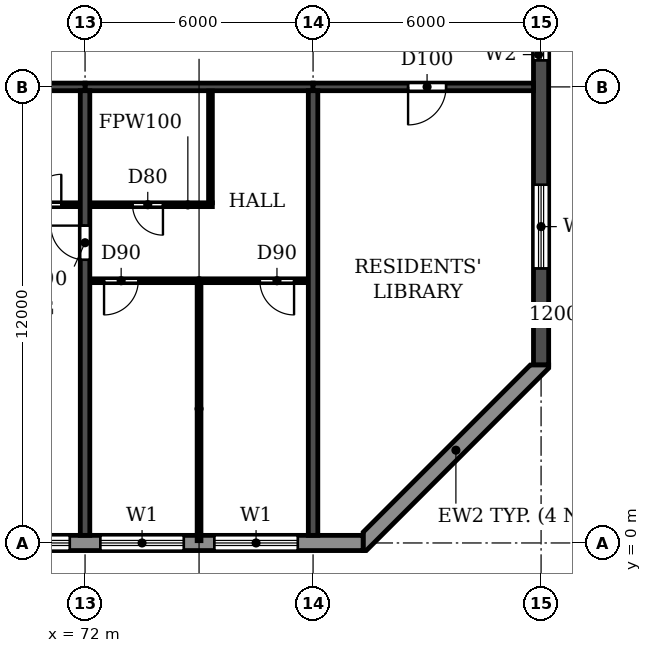
"""IFC4 building model, lengths in metres.
Left out: names, types, materials, properties, quantities, classifications, styles, units other than length and angle.
Written with IfcOpenShell. Run it as: python <this file> out.ifc"""

import sys

from ifc_helpers import new_model, si_unit, direction, frame, frame_2d, origin, place, context, subcontext, project, spatial, polyline, rectangle, outline, extrude, element, fill, save


model = new_model("IFC4")
c1 = context("Model", 3, precision=1e-05, world=origin(), true_north=direction((0.0, 1.0)))
c2 = subcontext(c1, "Body", "Model", "MODEL_VIEW")
j1 = project(units=[si_unit("LENGTHUNIT", "METRE"), si_unit("PLANEANGLEUNIT", "RADIAN")], contexts=[c1])
p1 = place(None, origin())
s1 = spatial("IfcSite", under=j1, at=p1, CompositionType="ELEMENT")
p2 = place(p1, origin())
s2 = spatial("IfcBuilding", under=s1, at=p2, CompositionType="ELEMENT")
p3 = place(p2, frame((0.0, 0.0, 231.3)))
s3 = spatial("IfcBuildingStorey", under=s2, at=p3, CompositionType="ELEMENT", Elevation=231.3)
p4 = place(p3, frame((72.0, 0.2, 0.0), z_axis=(0.0, 0.0, 1.0), x_axis=(0.0, 1.0, 0.0)))
e1 = element("IfcWall", 1, at=p4, inside=s3, PredefinedType="SHEAR", context=c2, shape_type="SweptSolid", body=[
    extrude(rectangle(XDim=11.7, YDim=0.25, at=frame_2d((5.85, 0.0))), origin(), (0.0, 0.0, 1.0), 3.08),
])
p5 = place(p4, frame((7.25, 0.0, 0.0)))
e2 = element("IfcOpeningElement", 2, at=p5, cuts=e1, PredefinedType="OPENING", context=c2, shape_type="SweptSolid", body=[
    extrude(rectangle(XDim=0.9, YDim=2.1, at=frame_2d((0.45, 1.05))), frame((0.0, 0.135, 0.0), z_axis=(0.0, -1.0, 0.0), x_axis=(1.0, 0.0, 0.0)), (0.0, 0.0, 1.0), 0.27),
])
p6 = place(p3, frame((78.0, 0.2, 0.0), z_axis=(0.0, 0.0, 1.0), x_axis=(0.0, 1.0, 0.0)))
e3 = element("IfcWall", 3, at=p6, inside=s3, PredefinedType="SHEAR", context=c2, shape_type="SweptSolid", body=[
    extrude(rectangle(XDim=11.7, YDim=0.25, at=frame_2d((5.85, 0.0))), origin(), (0.0, 0.0, 1.0), 3.08),
])
p7 = place(p3, frame((84.0, 4.683, 0.0), z_axis=(0.0, 0.0, 1.0), x_axis=(0.0, 1.0, 0.0)))
e4 = element("IfcWall", 4, at=p7, inside=s3, PredefinedType="SHEAR", context=c2, shape_type="SweptSolid", body=[
    extrude(rectangle(XDim=31.834, YDim=0.4, at=frame_2d((15.917, 0.0))), origin(), (0.0, 0.0, 1.0), 3.08),
])
p8 = place(p7, frame((23.817, 0.0, 0.9)))
e5 = element("IfcOpeningElement", 5, at=p8, cuts=e4, PredefinedType="OPENING", context=c2, shape_type="SweptSolid", body=[
    extrude(rectangle(XDim=1.2, YDim=1.5, at=frame_2d((0.6, 0.75))), frame((0.0, 0.21, 0.0), z_axis=(0.0, -1.0, 0.0), x_axis=(1.0, 0.0, 0.0)), (0.0, 0.0, 1.0), 0.42),
])
p9 = place(p7, frame((8.017, 0.0, 0.9)))
e6 = element("IfcOpeningElement", 6, at=p9, cuts=e4, PredefinedType="OPENING", context=c2, shape_type="SweptSolid", body=[
    extrude(rectangle(XDim=1.2, YDim=1.5, at=frame_2d((0.6, 0.75))), frame((0.0, 0.21, 0.0), z_axis=(0.0, -1.0, 0.0), x_axis=(1.0, 0.0, 0.0)), (0.0, 0.0, 1.0), 0.42),
])
p10 = place(p7, frame((27.694, 0.0, 0.6)))
e7 = element("IfcOpeningElement", 7, at=p10, cuts=e4, PredefinedType="OPENING", context=c2, shape_type="SweptSolid", body=[
    extrude(rectangle(XDim=2.2, YDim=1.8, at=frame_2d((1.1, 0.9))), frame((0.0, 0.21, 0.0), z_axis=(0.0, -1.0, 0.0), x_axis=(1.0, 0.0, 0.0)), (0.0, 0.0, 1.0), 0.42),
])
p11 = place(p7, frame((2.541, 0.0, 0.6)))
e8 = element("IfcOpeningElement", 8, at=p11, cuts=e4, PredefinedType="OPENING", context=c2, shape_type="SweptSolid", body=[
    extrude(rectangle(XDim=2.2, YDim=1.8, at=frame_2d((1.1, 0.9))), frame((0.0, 0.21, 0.0), z_axis=(0.0, -1.0, 0.0), x_axis=(1.0, 0.0, 0.0)), (0.0, 0.0, 1.0), 0.42),
])
p12 = place(p7, frame((15.917, 0.0, 0.9)))
e9 = element("IfcOpeningElement", 9, at=p12, cuts=e4, PredefinedType="OPENING", context=c2, shape_type="SweptSolid", body=[
    extrude(rectangle(XDim=1.2, YDim=1.5, at=frame_2d((0.6, 0.75))), frame((0.0, 0.21, 0.0), z_axis=(0.0, -1.0, 0.0), x_axis=(1.0, 0.0, 0.0)), (0.0, 0.0, 1.0), 0.42),
])
p13 = place(p3, frame((66.0, 12.0, 0.0), z_axis=(0.0, 0.0, 1.0), x_axis=(1.0, 0.0, 0.0)))
e10 = element("IfcWall", 10, at=p13, inside=s3, PredefinedType="SHEAR", context=c2, shape_type="SweptSolid", body=[
    extrude(rectangle(XDim=6.0, YDim=0.2, at=frame_2d((3.0, 0.0))), origin(), (0.0, 0.0, 1.0), 2.48),
])
p14 = place(p13, frame((2.55, 0.0, 0.0)))
e11 = element("IfcOpeningElement", 11, at=p14, cuts=e10, PredefinedType="OPENING", context=c2, shape_type="SweptSolid", body=[
    extrude(rectangle(XDim=1.0, YDim=2.1, at=frame_2d((0.5, 1.05))), frame((0.0, 0.11, 0.0), z_axis=(0.0, -1.0, 0.0), x_axis=(1.0, 0.0, 0.0)), (0.0, 0.0, 1.0), 0.22),
])
p15 = place(p3, frame((72.0, 12.0, 0.0), z_axis=(0.0, 0.0, 1.0), x_axis=(1.0, 0.0, 0.0)))
e12 = element("IfcWall", 12, at=p15, inside=s3, PredefinedType="SHEAR", context=c2, shape_type="SweptSolid", body=[
    extrude(rectangle(XDim=6.0, YDim=0.2, at=frame_2d((3.0, 0.0))), origin(), (0.0, 0.0, 1.0), 2.48),
])
p16 = place(p3, frame((78.0, 12.0, 0.0), z_axis=(0.0, 0.0, 1.0), x_axis=(1.0, 0.0, 0.0)))
e13 = element("IfcWall", 13, at=p16, inside=s3, PredefinedType="SHEAR", context=c2, shape_type="SweptSolid", body=[
    extrude(rectangle(XDim=5.8, YDim=0.2, at=frame_2d((2.9, 0.0))), origin(), (0.0, 0.0, 1.0), 2.48),
])
p17 = place(p16, frame((2.5, 0.0, 0.0)))
e14 = element("IfcOpeningElement", 14, at=p17, cuts=e13, PredefinedType="OPENING", context=c2, shape_type="SweptSolid", body=[
    extrude(rectangle(XDim=1.0, YDim=2.1, at=frame_2d((0.5, 1.05))), frame((0.0, 0.11, 0.0), z_axis=(0.0, -1.0, 0.0), x_axis=(1.0, 0.0, 0.0)), (0.0, 0.0, 1.0), 0.22),
])
p18 = place(p3, frame((22.683, 0.0, 0.0), z_axis=(0.0, 0.0, 1.0), x_axis=(1.0, 0.0, 0.0)))
e15 = element("IfcWall", 15, at=p18, inside=s3, PredefinedType="STANDARD", context=c2, shape_type="SweptSolid", body=[
    extrude(rectangle(XDim=56.634, YDim=0.4, at=frame_2d((28.317, 0.0))), origin(), (0.0, 0.0, 1.0), 3.08),
])
p19 = place(p18, frame((1.917, 0.0, 0.0)))
e16 = element("IfcOpeningElement", 16, at=p19, cuts=e15, PredefinedType="OPENING", context=c2, shape_type="SweptSolid", body=[
    extrude(rectangle(XDim=1.8, YDim=2.4, at=frame_2d((0.9, 1.2))), frame((0.0, 0.21, 0.0), z_axis=(0.0, -1.0, 0.0), x_axis=(1.0, 0.0, 0.0)), (0.0, 0.0, 1.0), 0.42),
])
p20 = place(p18, frame((4.717, 0.0, 0.9)))
e17 = element("IfcOpeningElement", 17, at=p20, cuts=e15, PredefinedType="OPENING", context=c2, shape_type="SweptSolid", body=[
    extrude(rectangle(XDim=2.2, YDim=1.5, at=frame_2d((1.1, 0.75))), frame((0.0, 0.21, 0.0), z_axis=(0.0, -1.0, 0.0), x_axis=(1.0, 0.0, 0.0)), (0.0, 0.0, 1.0), 0.42),
])
p21 = place(p18, frame((7.717, 0.0, 0.9)))
e18 = element("IfcOpeningElement", 18, at=p21, cuts=e15, PredefinedType="OPENING", context=c2, shape_type="SweptSolid", body=[
    extrude(rectangle(XDim=2.2, YDim=1.5, at=frame_2d((1.1, 0.75))), frame((0.0, 0.21, 0.0), z_axis=(0.0, -1.0, 0.0), x_axis=(1.0, 0.0, 0.0)), (0.0, 0.0, 1.0), 0.42),
])
p22 = place(p18, frame((10.717, 0.0, 0.9)))
e19 = element("IfcOpeningElement", 19, at=p22, cuts=e15, PredefinedType="OPENING", context=c2, shape_type="SweptSolid", body=[
    extrude(rectangle(XDim=2.2, YDim=1.5, at=frame_2d((1.1, 0.75))), frame((0.0, 0.21, 0.0), z_axis=(0.0, -1.0, 0.0), x_axis=(1.0, 0.0, 0.0)), (0.0, 0.0, 1.0), 0.42),
])
p23 = place(p18, frame((13.717, 0.0, 0.9)))
e20 = element("IfcOpeningElement", 20, at=p23, cuts=e15, PredefinedType="OPENING", context=c2, shape_type="SweptSolid", body=[
    extrude(rectangle(XDim=2.2, YDim=1.5, at=frame_2d((1.1, 0.75))), frame((0.0, 0.21, 0.0), z_axis=(0.0, -1.0, 0.0), x_axis=(1.0, 0.0, 0.0)), (0.0, 0.0, 1.0), 0.42),
])
p24 = place(p18, frame((16.917, 0.0, 0.0)))
e21 = element("IfcOpeningElement", 21, at=p24, cuts=e15, PredefinedType="OPENING", context=c2, shape_type="SweptSolid", body=[
    extrude(rectangle(XDim=1.8, YDim=2.4, at=frame_2d((0.9, 1.2))), frame((0.0, 0.21, 0.0), z_axis=(0.0, -1.0, 0.0), x_axis=(1.0, 0.0, 0.0)), (0.0, 0.0, 1.0), 0.42),
])
p25 = place(p18, frame((19.717, 0.0, 0.9)))
e22 = element("IfcOpeningElement", 22, at=p25, cuts=e15, PredefinedType="OPENING", context=c2, shape_type="SweptSolid", body=[
    extrude(rectangle(XDim=2.2, YDim=1.5, at=frame_2d((1.1, 0.75))), frame((0.0, 0.21, 0.0), z_axis=(0.0, -1.0, 0.0), x_axis=(1.0, 0.0, 0.0)), (0.0, 0.0, 1.0), 0.42),
])
p26 = place(p18, frame((22.717, 0.0, 0.9)))
e23 = element("IfcOpeningElement", 23, at=p26, cuts=e15, PredefinedType="OPENING", context=c2, shape_type="SweptSolid", body=[
    extrude(rectangle(XDim=2.2, YDim=1.5, at=frame_2d((1.1, 0.75))), frame((0.0, 0.21, 0.0), z_axis=(0.0, -1.0, 0.0), x_axis=(1.0, 0.0, 0.0)), (0.0, 0.0, 1.0), 0.42),
])
p27 = place(p18, frame((25.917, 0.0, 0.0)))
e24 = element("IfcOpeningElement", 24, at=p27, cuts=e15, PredefinedType="OPENING", context=c2, shape_type="SweptSolid", body=[
    extrude(rectangle(XDim=1.8, YDim=2.4, at=frame_2d((0.9, 1.2))), frame((0.0, 0.21, 0.0), z_axis=(0.0, -1.0, 0.0), x_axis=(1.0, 0.0, 0.0)), (0.0, 0.0, 1.0), 0.42),
])
p28 = place(p18, frame((28.717, 0.0, 0.9)))
e25 = element("IfcOpeningElement", 25, at=p28, cuts=e15, PredefinedType="OPENING", context=c2, shape_type="SweptSolid", body=[
    extrude(rectangle(XDim=2.2, YDim=1.5, at=frame_2d((1.1, 0.75))), frame((0.0, 0.21, 0.0), z_axis=(0.0, -1.0, 0.0), x_axis=(1.0, 0.0, 0.0)), (0.0, 0.0, 1.0), 0.42),
])
p29 = place(p18, frame((31.717, 0.0, 0.9)))
e26 = element("IfcOpeningElement", 26, at=p29, cuts=e15, PredefinedType="OPENING", context=c2, shape_type="SweptSolid", body=[
    extrude(rectangle(XDim=2.2, YDim=1.5, at=frame_2d((1.1, 0.75))), frame((0.0, 0.21, 0.0), z_axis=(0.0, -1.0, 0.0), x_axis=(1.0, 0.0, 0.0)), (0.0, 0.0, 1.0), 0.42),
])
p30 = place(p18, frame((34.717, 0.0, 0.9)))
e27 = element("IfcOpeningElement", 27, at=p30, cuts=e15, PredefinedType="OPENING", context=c2, shape_type="SweptSolid", body=[
    extrude(rectangle(XDim=2.2, YDim=1.5, at=frame_2d((1.1, 0.75))), frame((0.0, 0.21, 0.0), z_axis=(0.0, -1.0, 0.0), x_axis=(1.0, 0.0, 0.0)), (0.0, 0.0, 1.0), 0.42),
])
p31 = place(p18, frame((37.717, 0.0, 0.9)))
e28 = element("IfcOpeningElement", 28, at=p31, cuts=e15, PredefinedType="OPENING", context=c2, shape_type="SweptSolid", body=[
    extrude(rectangle(XDim=2.2, YDim=1.5, at=frame_2d((1.1, 0.75))), frame((0.0, 0.21, 0.0), z_axis=(0.0, -1.0, 0.0), x_axis=(1.0, 0.0, 0.0)), (0.0, 0.0, 1.0), 0.42),
])
p32 = place(p18, frame((40.917, 0.0, 0.0)))
e29 = element("IfcOpeningElement", 29, at=p32, cuts=e15, PredefinedType="OPENING", context=c2, shape_type="SweptSolid", body=[
    extrude(rectangle(XDim=1.8, YDim=2.4, at=frame_2d((0.9, 1.2))), frame((0.0, 0.21, 0.0), z_axis=(0.0, -1.0, 0.0), x_axis=(1.0, 0.0, 0.0)), (0.0, 0.0, 1.0), 0.42),
])
p33 = place(p18, frame((43.717, 0.0, 0.9)))
e30 = element("IfcOpeningElement", 30, at=p33, cuts=e15, PredefinedType="OPENING", context=c2, shape_type="SweptSolid", body=[
    extrude(rectangle(XDim=2.2, YDim=1.5, at=frame_2d((1.1, 0.75))), frame((0.0, 0.21, 0.0), z_axis=(0.0, -1.0, 0.0), x_axis=(1.0, 0.0, 0.0)), (0.0, 0.0, 1.0), 0.42),
])
p34 = place(p18, frame((46.717, 0.0, 0.9)))
e31 = element("IfcOpeningElement", 31, at=p34, cuts=e15, PredefinedType="OPENING", context=c2, shape_type="SweptSolid", body=[
    extrude(rectangle(XDim=2.2, YDim=1.5, at=frame_2d((1.1, 0.75))), frame((0.0, 0.21, 0.0), z_axis=(0.0, -1.0, 0.0), x_axis=(1.0, 0.0, 0.0)), (0.0, 0.0, 1.0), 0.42),
])
p35 = place(p18, frame((49.717, 0.0, 0.9)))
e32 = element("IfcOpeningElement", 32, at=p35, cuts=e15, PredefinedType="OPENING", context=c2, shape_type="SweptSolid", body=[
    extrude(rectangle(XDim=2.2, YDim=1.5, at=frame_2d((1.1, 0.75))), frame((0.0, 0.21, 0.0), z_axis=(0.0, -1.0, 0.0), x_axis=(1.0, 0.0, 0.0)), (0.0, 0.0, 1.0), 0.42),
])
p36 = place(p18, frame((52.717, 0.0, 0.9)))
e33 = element("IfcOpeningElement", 33, at=p36, cuts=e15, PredefinedType="OPENING", context=c2, shape_type="SweptSolid", body=[
    extrude(rectangle(XDim=2.2, YDim=1.5, at=frame_2d((1.1, 0.75))), frame((0.0, 0.21, 0.0), z_axis=(0.0, -1.0, 0.0), x_axis=(1.0, 0.0, 0.0)), (0.0, 0.0, 1.0), 0.42),
])
p37 = place(p3, origin())
e34 = element("IfcWall", 34, at=p37, inside=s3, PredefinedType="STANDARD", context=c2, shape_type="SweptSolid", body=[
    extrude(outline(polyline([(79.317, -0.2), (79.4, -0.2), (84.2, 4.6), (84.2, 4.683), (83.717, 4.683), (79.317, 0.283), (79.317, -0.2)])), origin(), (0.0, 0.0, 1.0), 3.08),
])
p38 = place(p3, frame((72.135, 6.9, 0.0), z_axis=(0.0, 0.0, 1.0), x_axis=(1.0, 0.0, 0.0)))
e35 = element("IfcWall", 35, at=p38, inside=s3, PredefinedType="PARTITIONING", context=c2, shape_type="SweptSolid", body=[
    extrude(rectangle(XDim=5.73, YDim=0.1, at=frame_2d((2.865, 0.0))), origin(), (0.0, 0.0, 1.0), 3.08),
])
p39 = place(p38, frame((0.365, 0.0, 0.0)))
e36 = element("IfcOpeningElement", 36, at=p39, cuts=e35, PredefinedType="OPENING", context=c2, shape_type="SweptSolid", body=[
    extrude(rectangle(XDim=0.9, YDim=2.1, at=frame_2d((0.45, 1.05))), frame((0.0, 0.06, 0.0), z_axis=(0.0, -1.0, 0.0), x_axis=(1.0, 0.0, 0.0)), (0.0, 0.0, 1.0), 0.12),
])
p40 = place(p38, frame((4.465, 0.0, 0.0)))
e37 = element("IfcOpeningElement", 37, at=p40, cuts=e35, PredefinedType="OPENING", context=c2, shape_type="SweptSolid", body=[
    extrude(rectangle(XDim=0.9, YDim=2.1, at=frame_2d((0.45, 1.05))), frame((0.0, 0.06, 0.0), z_axis=(0.0, -1.0, 0.0), x_axis=(1.0, 0.0, 0.0)), (0.0, 0.0, 1.0), 0.12),
])
p41 = place(p3, frame((69.9, 8.9, 0.0), z_axis=(0.0, 0.0, 1.0), x_axis=(1.0, 0.0, 0.0)))
e38 = element("IfcWall", 38, at=p41, inside=s3, PredefinedType="PARTITIONING", context=c2, shape_type="SweptSolid", body=[
    extrude(rectangle(XDim=1.965, YDim=0.1, at=frame_2d((0.982, 0.0))), origin(), (0.0, 0.0, 1.0), 3.08),
])
p42 = place(p41, frame((0.675, 0.0, 0.0)))
e39 = element("IfcOpeningElement", 39, at=p42, cuts=e38, PredefinedType="OPENING", context=c2, shape_type="SweptSolid", body=[
    extrude(rectangle(XDim=0.8, YDim=2.1, at=frame_2d((0.4, 1.05))), frame((0.0, 0.06, 0.0), z_axis=(0.0, -1.0, 0.0), x_axis=(1.0, 0.0, 0.0)), (0.0, 0.0, 1.0), 0.12),
])
p43 = place(p3, frame((72.135, 8.9, 0.0), z_axis=(0.0, 0.0, 1.0), x_axis=(1.0, 0.0, 0.0)))
e40 = element("IfcWall", 40, at=p43, inside=s3, PredefinedType="PARTITIONING", context=c2, shape_type="SweptSolid", body=[
    extrude(rectangle(XDim=3.215, YDim=0.1, at=frame_2d((1.607, 0.0))), origin(), (0.0, 0.0, 1.0), 3.08),
])
p44 = place(p43, frame((1.115, 0.0, 0.0)))
e41 = element("IfcOpeningElement", 41, at=p44, cuts=e40, PredefinedType="OPENING", context=c2, shape_type="SweptSolid", body=[
    extrude(rectangle(XDim=0.8, YDim=2.1, at=frame_2d((0.4, 1.05))), frame((0.0, 0.06, 0.0), z_axis=(0.0, -1.0, 0.0), x_axis=(1.0, 0.0, 0.0)), (0.0, 0.0, 1.0), 0.12),
])
p45 = place(p3, frame((75.0, 0.06, 0.0), z_axis=(0.0, 0.0, 1.0), x_axis=(0.0, 1.0, 0.0)))
e42 = element("IfcWall", 42, at=p45, inside=s3, PredefinedType="PARTITIONING", context=c2, shape_type="SweptSolid", body=[
    extrude(rectangle(XDim=6.79, YDim=0.1, at=frame_2d((3.395, 0.0))), origin(), (0.0, 0.0, 1.0), 3.08),
])
p46 = place(p3, frame((75.3, 8.95, 0.0), z_axis=(0.0, 0.0, 1.0), x_axis=(0.0, 1.0, 0.0)))
e43 = element("IfcWall", 43, at=p46, inside=s3, PredefinedType="PARTITIONING", context=c2, shape_type="SweptSolid", body=[
    extrude(rectangle(XDim=2.94, YDim=0.1, at=frame_2d((1.47, 0.0))), origin(), (0.0, 0.0, 1.0), 3.08),
])
p47 = place(p34, origin())
e44 = element("IfcWindow", 44, at=p47, inside=s3, PartitioningType="DOUBLE_PANEL_HORIZONTAL", PredefinedType="WINDOW", context=c2, shape_type="SweptSolid", body=[
    extrude(rectangle(XDim=2.2, YDim=1.5, at=frame_2d((1.1, 0.75))), frame((0.0, 0.03, 0.0), z_axis=(0.0, -1.0, 0.0), x_axis=(1.0, 0.0, 0.0)), (0.0, 0.0, 1.0), 0.06),
])
fill(e31, e44)
p48 = place(p35, origin())
e45 = element("IfcWindow", 45, at=p48, inside=s3, PartitioningType="DOUBLE_PANEL_HORIZONTAL", PredefinedType="WINDOW", context=c2, shape_type="SweptSolid", body=[
    extrude(rectangle(XDim=2.2, YDim=1.5, at=frame_2d((1.1, 0.75))), frame((0.0, 0.03, 0.0), z_axis=(0.0, -1.0, 0.0), x_axis=(1.0, 0.0, 0.0)), (0.0, 0.0, 1.0), 0.06),
])
fill(e32, e45)
p49 = place(p36, origin())
e46 = element("IfcWindow", 46, at=p49, inside=s3, PartitioningType="DOUBLE_PANEL_HORIZONTAL", PredefinedType="WINDOW", context=c2, shape_type="SweptSolid", body=[
    extrude(rectangle(XDim=2.2, YDim=1.5, at=frame_2d((1.1, 0.75))), frame((0.0, 0.03, 0.0), z_axis=(0.0, -1.0, 0.0), x_axis=(1.0, 0.0, 0.0)), (0.0, 0.0, 1.0), 0.06),
])
fill(e33, e46)
p50 = place(p9, origin())
e47 = element("IfcWindow", 47, at=p50, inside=s3, PartitioningType="SINGLE_PANEL", PredefinedType="WINDOW", context=c2, shape_type="SweptSolid", body=[
    extrude(rectangle(XDim=1.2, YDim=1.5, at=frame_2d((0.6, 0.75))), frame((0.0, 0.03, 0.0), z_axis=(0.0, -1.0, 0.0), x_axis=(1.0, 0.0, 0.0)), (0.0, 0.0, 1.0), 0.06),
])
fill(e6, e47)
p51 = place(p11, origin())
e48 = element("IfcWindow", 48, at=p51, inside=s3, PartitioningType="DOUBLE_PANEL_HORIZONTAL", PredefinedType="WINDOW", context=c2, shape_type="SweptSolid", body=[
    extrude(rectangle(XDim=2.2, YDim=1.8, at=frame_2d((1.1, 0.9))), frame((0.0, 0.03, 0.0), z_axis=(0.0, -1.0, 0.0), x_axis=(1.0, 0.0, 0.0)), (0.0, 0.0, 1.0), 0.06),
])
fill(e8, e48)
p52 = place(p39, frame((0.9, 0.0, 0.0), z_axis=(0.0, 0.0, 1.0), x_axis=(-1.0, 0.0, 0.0)))
e49 = element("IfcDoor", 49, at=p52, inside=s3, OperationType="SINGLE_SWING_RIGHT", PredefinedType="DOOR", context=c2, shape_type="SweptSolid", body=[
    extrude(rectangle(XDim=0.9, YDim=2.1, at=frame_2d((0.45, 1.05))), frame((0.0, 0.025, 0.0), z_axis=(0.0, -1.0, 0.0), x_axis=(1.0, 0.0, 0.0)), (0.0, 0.0, 1.0), 0.05),
])
fill(e36, e49)
p53 = place(p44, frame((0.8, 0.0, 0.0), z_axis=(0.0, 0.0, 1.0), x_axis=(-1.0, 0.0, 0.0)))
e50 = element("IfcDoor", 50, at=p53, inside=s3, OperationType="SINGLE_SWING_LEFT", PredefinedType="DOOR", context=c2, shape_type="SweptSolid", body=[
    extrude(rectangle(XDim=0.8, YDim=2.1, at=frame_2d((0.4, 1.05))), frame((0.0, 0.025, 0.0), z_axis=(0.0, -1.0, 0.0), x_axis=(1.0, 0.0, 0.0)), (0.0, 0.0, 1.0), 0.05),
])
fill(e41, e50)
p54 = place(p40, frame((0.9, 0.0, 0.0), z_axis=(0.0, 0.0, 1.0), x_axis=(-1.0, 0.0, 0.0)))
e51 = element("IfcDoor", 51, at=p54, inside=s3, OperationType="SINGLE_SWING_LEFT", PredefinedType="DOOR", context=c2, shape_type="SweptSolid", body=[
    extrude(rectangle(XDim=0.9, YDim=2.1, at=frame_2d((0.45, 1.05))), frame((0.0, 0.025, 0.0), z_axis=(0.0, -1.0, 0.0), x_axis=(1.0, 0.0, 0.0)), (0.0, 0.0, 1.0), 0.05),
])
fill(e37, e51)
p55 = place(p42, origin())
e52 = element("IfcDoor", 52, at=p55, inside=s3, OperationType="SINGLE_SWING_RIGHT", PredefinedType="DOOR", context=c2, shape_type="SweptSolid", body=[
    extrude(rectangle(XDim=0.8, YDim=2.1, at=frame_2d((0.4, 1.05))), frame((0.0, 0.025, 0.0), z_axis=(0.0, -1.0, 0.0), x_axis=(1.0, 0.0, 0.0)), (0.0, 0.0, 1.0), 0.05),
])
fill(e39, e52)
p56 = place(p5, origin())
e53 = element("IfcDoor", 53, at=p56, inside=s3, OperationType="SINGLE_SWING_RIGHT", PredefinedType="DOOR", context=c2, shape_type="SweptSolid", body=[
    extrude(rectangle(XDim=0.9, YDim=2.1, at=frame_2d((0.45, 1.05))), frame((0.0, 0.025, 0.0), z_axis=(0.0, -1.0, 0.0), x_axis=(1.0, 0.0, 0.0)), (0.0, 0.0, 1.0), 0.05),
])
fill(e2, e53)
p57 = place(p17, frame((1.0, 0.0, 0.0), z_axis=(0.0, 0.0, 1.0), x_axis=(-1.0, 0.0, 0.0)))
e54 = element("IfcDoor", 54, at=p57, inside=s3, OperationType="SINGLE_SWING_RIGHT", PredefinedType="DOOR", context=c2, shape_type="SweptSolid", body=[
    extrude(rectangle(XDim=1.0, YDim=2.1, at=frame_2d((0.5, 1.05))), frame((0.0, 0.025, 0.0), z_axis=(0.0, -1.0, 0.0), x_axis=(1.0, 0.0, 0.0)), (0.0, 0.0, 1.0), 0.05),
])
fill(e14, e54)
save(model, sys.argv[1])
